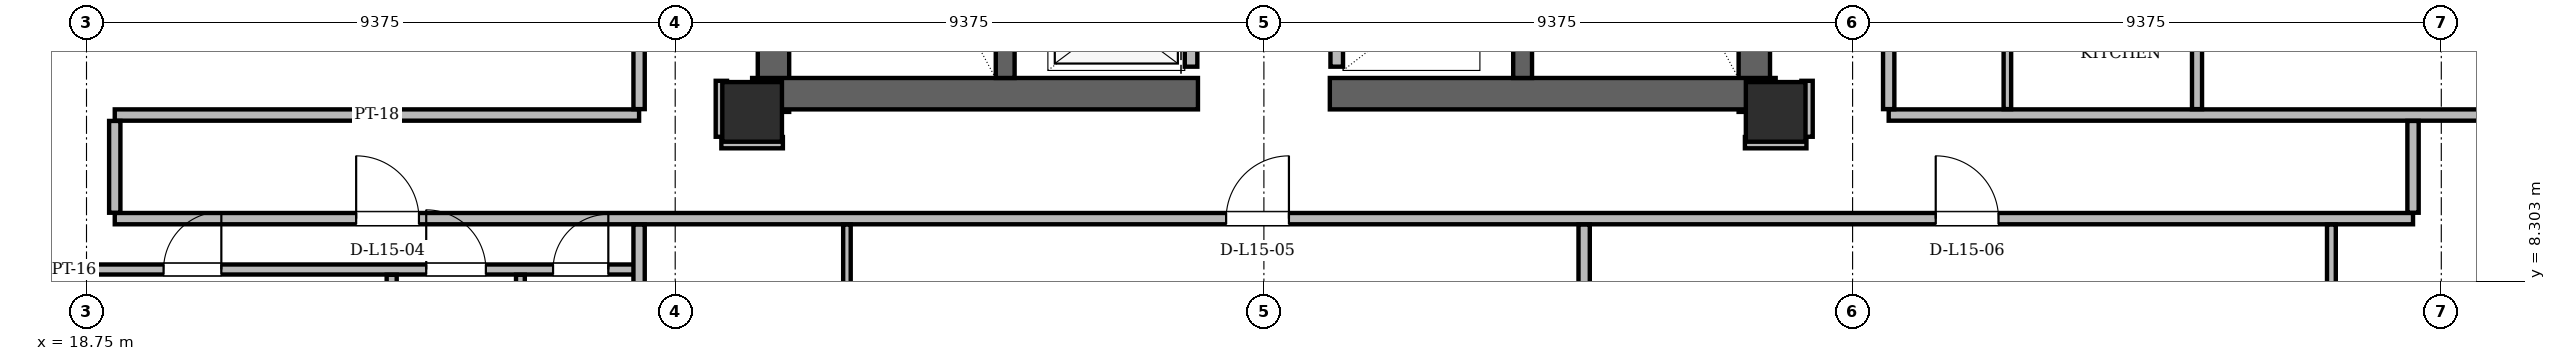
"""IFC4 building model, lengths in metres.
Left out: names, types, materials, properties, quantities, classifications, styles, units other than length and angle.
Written with IfcOpenShell. Run it as: python <this file> out.ifc"""

import sys

from ifc_helpers import new_model, si_unit, direction, frame, frame_2d, origin, origin_2d, place, context, subcontext, project, spatial, rectangle, hollow_rectangle, extrude, element, fill, save


model = new_model("IFC4")
c1 = context("Model", 3, precision=1e-05, world=origin(), true_north=direction((0.0, 1.0)))
c2 = subcontext(c1, "Body", "Model", "MODEL_VIEW")
j1 = project(units=[si_unit("LENGTHUNIT", "METRE"), si_unit("PLANEANGLEUNIT", "RADIAN")], contexts=[c1])
p1 = place(None, origin())
s1 = spatial("IfcSite", under=j1, at=p1, CompositionType="ELEMENT")
p2 = place(p1, origin())
s2 = spatial("IfcBuilding", under=s1, at=p2, CompositionType="ELEMENT")
p3 = place(p2, frame((0.0, 0.0, 59.7)))
s3 = spatial("IfcBuildingStorey", under=s2, at=p3, CompositionType="ELEMENT", Elevation=59.7)
for number, where, z_axis, x_axis in (
    (1, (29.35, 11.0, 0.0), (0.0, 0.0, 1.0), (1.0, 0.0, 0.0)),
    (2, (45.65, 11.0, 0.0), (0.0, 0.0, 1.0), (1.0, 0.0, 0.0)),
):
    element("IfcColumn", number, at=place(p3, frame(where, z_axis=z_axis, x_axis=x_axis)), inside=s3, PredefinedType="COLUMN", context=c2, shape_type="SweptSolid", body=[
        extrude(hollow_rectangle(XDim=0.95, YDim=0.95, WallThickness=0.08, at=origin_2d()), origin(), (0.0, 0.0, 1.0), 3.6),
    ])
for number, where, z_axis, x_axis in (
    (3, (29.69, 11.0, 0.0), (0.0, 0.0, 1.0), (0.0, 1.0, 0.0)),
    (4, (45.31, 11.0, 0.0), (0.0, 0.0, 1.0), (0.0, 1.0, 0.0)),
):
    element("IfcWall", number, at=place(p3, frame(where, z_axis=z_axis, x_axis=x_axis)), inside=s3, PredefinedType="SHEAR", context=c2, shape_type="SweptSolid", body=[
        extrude(rectangle(XDim=13.3, YDim=0.5, at=frame_2d((6.65, 0.0))), origin(), (0.0, 0.0, 1.0), 3.36),
    ])
for number, where, z_axis, x_axis in (
    (5, (29.35, 11.29, 0.0), (0.0, 0.0, 1.0), (1.0, 0.0, 0.0)),
    (6, (38.55, 11.29, 0.0), (0.0, 0.0, 1.0), (1.0, 0.0, 0.0)),
):
    element("IfcWall", number, at=place(p3, frame(where, z_axis=z_axis, x_axis=x_axis)), inside=s3, PredefinedType="SHEAR", context=c2, shape_type="SweptSolid", body=[
        extrude(rectangle(XDim=7.1, YDim=0.5, at=frame_2d((3.55, 0.0))), origin(), (0.0, 0.0, 1.0), 3.36),
    ])
for number, where, z_axis, x_axis in (
    (7, (33.38, 11.54, 0.0), (0.0, 0.0, 1.0), (0.0, 1.0, 0.0)),
    (8, (41.62, 11.54, 0.0), (0.0, 0.0, 1.0), (0.0, 1.0, 0.0)),
):
    element("IfcWall", number, at=place(p3, frame(where, z_axis=z_axis, x_axis=x_axis)), inside=s3, PredefinedType="SHEAR", context=c2, shape_type="SweptSolid", body=[
        extrude(rectangle(XDim=7.62, YDim=0.3, at=frame_2d((3.81, 0.0))), origin(), (0.0, 0.0, 1.0), 3.36),
    ])
p4 = place(p3, frame((13.666, 14.47, 0.0), z_axis=(0.0, 0.0, 1.0), x_axis=(0.499996557917, -0.866027391063, 0.0)))
e9 = element("IfcWall", 9, at=p4, inside=s3, PredefinedType="SOLIDWALL", context=c2, shape_type="SweptSolid", body=[
    extrude(rectangle(XDim=14.083, YDim=0.34, at=frame_2d((7.042, 0.0))), origin(), (0.0, 0.0, 1.0), 2.494),
])
p5 = place(p3, frame((54.292, 2.274, 0.0), z_axis=(0.0, 0.0, 1.0), x_axis=(0.499996557917, 0.866027391063, 0.0)))
e10 = element("IfcWall", 10, at=p5, inside=s3, PredefinedType="SOLIDWALL", context=c2, shape_type="SweptSolid", body=[
    extrude(rectangle(XDim=14.083, YDim=0.34, at=frame_2d((7.042, 0.0))), origin(), (0.0, 0.0, 1.0), 2.494),
])
p6 = place(p5, frame((8.787, 0.0, 0.85)))
e11 = element("IfcOpeningElement", 11, at=p6, cuts=e10, PredefinedType="OPENING", context=c2, shape_type="SweptSolid", body=[
    extrude(rectangle(XDim=1.2, YDim=1.48, at=frame_2d((0.6, 0.74))), frame((0.0, 0.17, 0.0), z_axis=(0.0, -1.0, 0.0), x_axis=(1.0, 0.0, 0.0)), (0.0, 0.0, 1.0), 0.34),
])
p7 = place(p3, frame((36.34, 11.72, 0.0), z_axis=(0.0, 0.0, 1.0), x_axis=(0.0, 1.0, 0.0)))
e12 = element("IfcWall", 12, at=p7, inside=s3, PredefinedType="PARTITIONING", context=c2, shape_type="SweptSolid", body=[
    extrude(rectangle(XDim=7.6, YDim=0.2, at=frame_2d((3.8, 0.0))), origin(), (0.0, 0.0, 1.0), 3.36),
])
p8 = place(p7, frame((0.255, 0.0, 0.0)))
e13 = element("IfcOpeningElement", 13, at=p8, cuts=e12, PredefinedType="OPENING", context=c2, shape_type="SweptSolid", body=[
    extrude(rectangle(XDim=1.05, YDim=2.15, at=frame_2d((0.525, 1.075))), frame((0.0, 0.1, 0.0), z_axis=(0.0, -1.0, 0.0), x_axis=(1.0, 0.0, 0.0)), (0.0, 0.0, 1.0), 0.2),
])
p9 = place(p7, frame((2.105, 0.0, 0.0)))
e14 = element("IfcOpeningElement", 14, at=p9, cuts=e12, PredefinedType="OPENING", context=c2, shape_type="SweptSolid", body=[
    extrude(rectangle(XDim=1.05, YDim=2.15, at=frame_2d((0.525, 1.075))), frame((0.0, 0.1, 0.0), z_axis=(0.0, -1.0, 0.0), x_axis=(1.0, 0.0, 0.0)), (0.0, 0.0, 1.0), 0.2),
])
p10 = place(p7, frame((3.955, 0.0, 0.0)))
e15 = element("IfcOpeningElement", 15, at=p10, cuts=e12, PredefinedType="OPENING", context=c2, shape_type="SweptSolid", body=[
    extrude(rectangle(XDim=1.05, YDim=2.15, at=frame_2d((0.525, 1.075))), frame((0.0, 0.1, 0.0), z_axis=(0.0, -1.0, 0.0), x_axis=(1.0, 0.0, 0.0)), (0.0, 0.0, 1.0), 0.2),
])
p11 = place(p3, frame((38.66, 11.72, 0.0), z_axis=(0.0, 0.0, 1.0), x_axis=(0.0, 1.0, 0.0)))
e16 = element("IfcWall", 16, at=p11, inside=s3, PredefinedType="PARTITIONING", context=c2, shape_type="SweptSolid", body=[
    extrude(rectangle(XDim=9.1, YDim=0.2, at=frame_2d((4.55, 0.0))), origin(), (0.0, 0.0, 1.0), 3.36),
])
p12 = place(p3, frame((17.32, 8.49, 0.0), z_axis=(0.0, 0.0, 1.0), x_axis=(1.0, 0.0, 0.0)))
e17 = element("IfcWall", 17, at=p12, inside=s3, PredefinedType="PARTITIONING", context=c2, shape_type="SweptSolid", body=[
    extrude(rectangle(XDim=10.281, YDim=0.16, at=frame_2d((5.14, 0.0))), origin(), (0.0, 0.0, 1.0), 2.738),
])
p13 = place(p12, frame((2.658, 0.0, 0.0)))
e18 = element("IfcOpeningElement", 18, at=p13, cuts=e17, PredefinedType="OPENING", context=c2, shape_type="SweptSolid", body=[
    extrude(rectangle(XDim=0.92, YDim=2.12, at=frame_2d((0.46, 1.06))), frame((0.0, 0.08, 0.0), z_axis=(0.0, -1.0, 0.0), x_axis=(1.0, 0.0, 0.0)), (0.0, 0.0, 1.0), 0.16),
])
p14 = place(p12, frame((6.841, 0.0, 0.0)))
e19 = element("IfcOpeningElement", 19, at=p14, cuts=e17, PredefinedType="OPENING", context=c2, shape_type="SweptSolid", body=[
    extrude(rectangle(XDim=0.95, YDim=2.1, at=frame_2d((0.475, 1.05))), frame((0.0, 0.08, 0.0), z_axis=(0.0, -1.0, 0.0), x_axis=(1.0, 0.0, 0.0)), (0.0, 0.0, 1.0), 0.16),
])
p15 = place(p12, frame((8.861, 0.0, 0.0)))
e20 = element("IfcOpeningElement", 20, at=p15, cuts=e17, PredefinedType="OPENING", context=c2, shape_type="SweptSolid", body=[
    extrude(rectangle(XDim=0.88, YDim=2.08, at=frame_2d((0.44, 1.04))), frame((0.0, 0.08, 0.0), z_axis=(0.0, -1.0, 0.0), x_axis=(1.0, 0.0, 0.0)), (0.0, 0.0, 1.0), 0.16),
])
p16 = place(p3, frame((19.2, 9.3, 0.0), z_axis=(0.0, 0.0, 1.0), x_axis=(1.0, 0.0, 0.0)))
e21 = element("IfcWall", 21, at=p16, inside=s3, PredefinedType="PARTITIONING", context=c2, shape_type="SweptSolid", body=[
    extrude(rectangle(XDim=36.6, YDim=0.18, at=frame_2d((18.3, 0.0))), origin(), (0.0, 0.0, 1.0), 2.738),
])
p17 = place(p16, frame((3.844, 0.0, 0.0)))
e22 = element("IfcOpeningElement", 22, at=p17, cuts=e21, PredefinedType="OPENING", context=c2, shape_type="SweptSolid", body=[
    extrude(rectangle(XDim=1.0, YDim=2.18, at=frame_2d((0.5, 1.09))), frame((0.0, 0.09, 0.0), z_axis=(0.0, -1.0, 0.0), x_axis=(1.0, 0.0, 0.0)), (0.0, 0.0, 1.0), 0.18),
])
p18 = place(p16, frame((17.699, 0.0, 0.0)))
e23 = element("IfcOpeningElement", 23, at=p18, cuts=e21, PredefinedType="OPENING", context=c2, shape_type="SweptSolid", body=[
    extrude(rectangle(XDim=1.0, YDim=2.18, at=frame_2d((0.5, 1.09))), frame((0.0, 0.09, 0.0), z_axis=(0.0, -1.0, 0.0), x_axis=(1.0, 0.0, 0.0)), (0.0, 0.0, 1.0), 0.18),
])
p19 = place(p16, frame((28.999, 0.0, 0.0)))
e24 = element("IfcOpeningElement", 24, at=p19, cuts=e21, PredefinedType="OPENING", context=c2, shape_type="SweptSolid", body=[
    extrude(rectangle(XDim=1.0, YDim=2.18, at=frame_2d((0.5, 1.09))), frame((0.0, 0.09, 0.0), z_axis=(0.0, -1.0, 0.0), x_axis=(1.0, 0.0, 0.0)), (0.0, 0.0, 1.0), 0.18),
])
for number, where, z_axis, x_axis in (
    (25, (28.86, 10.51, 0.0), (0.0, 0.0, 1.0), (1.0, 0.0, 0.0)),
    (26, (45.16, 10.51, 0.0), (0.0, 0.0, 1.0), (1.0, 0.0, 0.0)),
):
    element("IfcWall", number, at=place(p3, frame(where, z_axis=z_axis, x_axis=x_axis)), inside=s3, PredefinedType="PARTITIONING", context=c2, shape_type="SweptSolid", body=[
        extrude(rectangle(XDim=0.98, YDim=0.18, at=frame_2d((0.49, 0.0))), origin(), (0.0, 0.0, 1.0), 2.738),
    ])
p20 = place(p3, frame((19.2, 10.95, 0.0), z_axis=(0.0, 0.0, 1.0), x_axis=(1.0, 0.0, 0.0)))
e27 = element("IfcWall", 27, at=p20, inside=s3, PredefinedType="PARTITIONING", context=c2, shape_type="SweptSolid", body=[
    extrude(rectangle(XDim=8.35, YDim=0.18, at=frame_2d((4.175, 0.0))), origin(), (0.0, 0.0, 1.0), 3.36),
])
p21 = place(p3, frame((47.45, 10.95, 0.0), z_axis=(0.0, 0.0, 1.0), x_axis=(1.0, 0.0, 0.0)))
e28 = element("IfcWall", 28, at=p21, inside=s3, PredefinedType="PARTITIONING", context=c2, shape_type="SweptSolid", body=[
    extrude(rectangle(XDim=11.651, YDim=0.18, at=frame_2d((5.825, 0.0))), origin(), (0.0, 0.0, 1.0), 3.36),
])
p22 = place(p3, frame((19.2, 9.394, 0.0), z_axis=(0.0, 0.0, 1.0), x_axis=(0.0, 1.0, 0.0)))
e29 = element("IfcWall", 29, at=p22, inside=s3, PredefinedType="PARTITIONING", context=c2, shape_type="SweptSolid", body=[
    extrude(rectangle(XDim=1.462, YDim=0.18, at=frame_2d((0.731, 0.0))), origin(), (0.0, 0.0, 1.0), 3.36),
])
p23 = place(p3, frame((23.61, 2.448, 0.0), z_axis=(0.0, 0.0, 1.0), x_axis=(0.0, 1.0, 0.0)))
e30 = element("IfcWall", 30, at=p23, inside=s3, PredefinedType="PARTITIONING", context=c2, shape_type="SweptSolid", body=[
    extrude(rectangle(XDim=5.958, YDim=0.16, at=frame_2d((2.979, 0.0))), origin(), (0.0, 0.0, 1.0), 2.738),
])
p24 = place(p3, frame((25.66, 2.448, 0.0), z_axis=(0.0, 0.0, 1.0), x_axis=(0.0, 1.0, 0.0)))
e31 = element("IfcWall", 31, at=p24, inside=s3, PredefinedType="PARTITIONING", context=c2, shape_type="SweptSolid", body=[
    extrude(rectangle(XDim=5.958, YDim=0.14, at=frame_2d((2.979, 0.0))), origin(), (0.0, 0.0, 1.0), 2.738),
])
p25 = place(p3, frame((27.55, 2.448, 0.0), z_axis=(0.0, 0.0, 1.0), x_axis=(0.0, 1.0, 0.0)))
e32 = element("IfcWall", 32, at=p25, inside=s3, PredefinedType="PARTITIONING", context=c2, shape_type="SweptSolid", body=[
    extrude(rectangle(XDim=6.758, YDim=0.18, at=frame_2d((3.379, 0.0))), origin(), (0.0, 0.0, 1.0), 2.738),
])
p26 = place(p3, frame((27.55, 11.044, 0.0), z_axis=(0.0, 0.0, 1.0), x_axis=(0.0, 1.0, 0.0)))
e33 = element("IfcWall", 33, at=p26, inside=s3, PredefinedType="PARTITIONING", context=c2, shape_type="SweptSolid", body=[
    extrude(rectangle(XDim=27.127, YDim=0.18, at=frame_2d((13.563, 0.0))), origin(), (0.0, 0.0, 1.0), 2.494),
])
p27 = place(p26, frame((10.795, 0.0, 0.0)))
e34 = element("IfcOpeningElement", 34, at=p27, cuts=e33, PredefinedType="OPENING", context=c2, shape_type="SweptSolid", body=[
    extrude(rectangle(XDim=1.0, YDim=2.18, at=frame_2d((0.5, 1.09))), frame((0.0, 0.09, 0.0), z_axis=(0.0, -1.0, 0.0), x_axis=(1.0, 0.0, 0.0)), (0.0, 0.0, 1.0), 0.18),
])
p28 = place(p3, frame((28.86, 10.604, 0.0), z_axis=(0.0, 0.0, 1.0), x_axis=(0.0, 1.0, 0.0)))
e35 = element("IfcWall", 35, at=p28, inside=s3, PredefinedType="PARTITIONING", context=c2, shape_type="SweptSolid", body=[
    extrude(rectangle(XDim=0.891, YDim=0.18, at=frame_2d((0.446, 0.0))), origin(), (0.0, 0.0, 1.0), 2.738),
])
p29 = place(p3, frame((30.86, 2.542, 0.0), z_axis=(0.0, 0.0, 1.0), x_axis=(0.0, 1.0, 0.0)))
e36 = element("IfcWall", 36, at=p29, inside=s3, PredefinedType="PARTITIONING", context=c2, shape_type="SweptSolid", body=[
    extrude(rectangle(XDim=6.664, YDim=0.12, at=frame_2d((3.332, 0.0))), origin(), (0.0, 0.0, 1.0), 2.946),
])
p30 = place(p29, frame((2.879, 0.0, 0.0)))
e37 = element("IfcOpeningElement", 37, at=p30, cuts=e36, PredefinedType="OPENING", context=c2, shape_type="SweptSolid", body=[
    extrude(rectangle(XDim=0.88, YDim=2.08, at=frame_2d((0.44, 1.04))), frame((0.0, 0.06, 0.0), z_axis=(0.0, -1.0, 0.0), x_axis=(1.0, 0.0, 0.0)), (0.0, 0.0, 1.0), 0.12),
])
p31 = place(p3, frame((42.6, 2.448, 0.0), z_axis=(0.0, 0.0, 1.0), x_axis=(0.0, 1.0, 0.0)))
e38 = element("IfcWall", 38, at=p31, inside=s3, PredefinedType="PARTITIONING", context=c2, shape_type="SweptSolid", body=[
    extrude(rectangle(XDim=6.758, YDim=0.18, at=frame_2d((3.379, 0.0))), origin(), (0.0, 0.0, 1.0), 2.946),
])
p32 = place(p3, frame((46.15, 10.604, 0.0), z_axis=(0.0, 0.0, 1.0), x_axis=(0.0, 1.0, 0.0)))
e39 = element("IfcWall", 39, at=p32, inside=s3, PredefinedType="PARTITIONING", context=c2, shape_type="SweptSolid", body=[
    extrude(rectangle(XDim=0.891, YDim=0.18, at=frame_2d((0.446, 0.0))), origin(), (0.0, 0.0, 1.0), 2.738),
])
p33 = place(p3, frame((47.45, 11.044, 0.0), z_axis=(0.0, 0.0, 1.0), x_axis=(0.0, 1.0, 0.0)))
e40 = element("IfcWall", 40, at=p33, inside=s3, PredefinedType="PARTITIONING", context=c2, shape_type="SweptSolid", body=[
    extrude(rectangle(XDim=14.832, YDim=0.18, at=frame_2d((7.416, 0.0))), origin(), (0.0, 0.0, 1.0), 2.738),
])
p34 = place(p33, frame((6.079, 0.0, 0.0)))
e41 = element("IfcOpeningElement", 41, at=p34, cuts=e40, PredefinedType="OPENING", context=c2, shape_type="SweptSolid", body=[
    extrude(rectangle(XDim=1.0, YDim=2.18, at=frame_2d((0.5, 1.09))), frame((0.0, 0.09, 0.0), z_axis=(0.0, -1.0, 0.0), x_axis=(1.0, 0.0, 0.0)), (0.0, 0.0, 1.0), 0.18),
])
p35 = place(p33, frame((10.668, 0.0, 0.0)))
e42 = element("IfcOpeningElement", 42, at=p35, cuts=e40, PredefinedType="OPENING", context=c2, shape_type="SweptSolid", body=[
    extrude(rectangle(XDim=1.0, YDim=2.18, at=frame_2d((0.5, 1.09))), frame((0.0, 0.09, 0.0), z_axis=(0.0, -1.0, 0.0), x_axis=(1.0, 0.0, 0.0)), (0.0, 0.0, 1.0), 0.18),
])
p36 = place(p3, frame((49.34, 11.044, 0.0), z_axis=(0.0, 0.0, 1.0), x_axis=(0.0, 1.0, 0.0)))
e43 = element("IfcWall", 43, at=p36, inside=s3, PredefinedType="PARTITIONING", context=c2, shape_type="SweptSolid", body=[
    extrude(rectangle(XDim=3.102, YDim=0.12, at=frame_2d((1.551, 0.0))), origin(), (0.0, 0.0, 1.0), 2.738),
])
p37 = place(p3, frame((52.36, 11.044, 0.0), z_axis=(0.0, 0.0, 1.0), x_axis=(0.0, 1.0, 0.0)))
e44 = element("IfcWall", 44, at=p37, inside=s3, PredefinedType="PARTITIONING", context=c2, shape_type="SweptSolid", body=[
    extrude(rectangle(XDim=3.102, YDim=0.16, at=frame_2d((1.551, 0.0))), origin(), (0.0, 0.0, 1.0), 2.738),
])
p38 = place(p3, frame((54.5, 2.981, 0.0), z_axis=(0.0, 0.0, 1.0), x_axis=(0.0, 1.0, 0.0)))
e45 = element("IfcWall", 45, at=p38, inside=s3, PredefinedType="PARTITIONING", context=c2, shape_type="SweptSolid", body=[
    extrude(rectangle(XDim=6.225, YDim=0.14, at=frame_2d((3.112, 0.0))), origin(), (0.0, 0.0, 1.0), 3.36),
])
p39 = place(p38, frame((2.693, 0.0, 0.0)))
e46 = element("IfcOpeningElement", 46, at=p39, cuts=e45, PredefinedType="OPENING", context=c2, shape_type="SweptSolid", body=[
    extrude(rectangle(XDim=0.88, YDim=2.08, at=frame_2d((0.44, 1.04))), frame((0.0, 0.07, 0.0), z_axis=(0.0, -1.0, 0.0), x_axis=(1.0, 0.0, 0.0)), (0.0, 0.0, 1.0), 0.14),
])
p40 = place(p3, frame((55.8, 9.394, 0.0), z_axis=(0.0, 0.0, 1.0), x_axis=(0.0, 1.0, 0.0)))
e47 = element("IfcWall", 47, at=p40, inside=s3, PredefinedType="PARTITIONING", context=c2, shape_type="SweptSolid", body=[
    extrude(rectangle(XDim=1.462, YDim=0.18, at=frame_2d((0.731, 0.0))), origin(), (0.0, 0.0, 1.0), 3.36),
])
p41 = place(p13, origin())
e48 = element("IfcDoor", 48, at=p41, inside=s3, OperationType="SINGLE_SWING_RIGHT", PredefinedType="DOOR", context=c2, shape_type="SweptSolid", body=[
    extrude(rectangle(XDim=0.92, YDim=2.12, at=frame_2d((0.46, 1.06))), frame((0.0, 0.025, 0.0), z_axis=(0.0, -1.0, 0.0), x_axis=(1.0, 0.0, 0.0)), (0.0, 0.0, 1.0), 0.05),
])
fill(e18, e48)
p42 = place(p14, origin())
e49 = element("IfcDoor", 49, at=p42, inside=s3, OperationType="SINGLE_SWING_LEFT", PredefinedType="DOOR", context=c2, shape_type="SweptSolid", body=[
    extrude(rectangle(XDim=0.95, YDim=2.1, at=frame_2d((0.475, 1.05))), frame((0.0, 0.025, 0.0), z_axis=(0.0, -1.0, 0.0), x_axis=(1.0, 0.0, 0.0)), (0.0, 0.0, 1.0), 0.05),
])
fill(e19, e49)
p43 = place(p15, origin())
e50 = element("IfcDoor", 50, at=p43, inside=s3, OperationType="SINGLE_SWING_RIGHT", PredefinedType="DOOR", context=c2, shape_type="SweptSolid", body=[
    extrude(rectangle(XDim=0.88, YDim=2.08, at=frame_2d((0.44, 1.04))), frame((0.0, 0.025, 0.0), z_axis=(0.0, -1.0, 0.0), x_axis=(1.0, 0.0, 0.0)), (0.0, 0.0, 1.0), 0.05),
])
fill(e20, e50)
p44 = place(p17, origin())
e51 = element("IfcDoor", 51, at=p44, inside=s3, OperationType="SINGLE_SWING_LEFT", PredefinedType="DOOR", context=c2, shape_type="SweptSolid", body=[
    extrude(rectangle(XDim=1.0, YDim=2.18, at=frame_2d((0.5, 1.09))), frame((0.0, 0.025, 0.0), z_axis=(0.0, -1.0, 0.0), x_axis=(1.0, 0.0, 0.0)), (0.0, 0.0, 1.0), 0.05),
])
fill(e22, e51)
p45 = place(p18, origin())
e52 = element("IfcDoor", 52, at=p45, inside=s3, OperationType="SINGLE_SWING_RIGHT", PredefinedType="DOOR", context=c2, shape_type="SweptSolid", body=[
    extrude(rectangle(XDim=1.0, YDim=2.18, at=frame_2d((0.5, 1.09))), frame((0.0, 0.025, 0.0), z_axis=(0.0, -1.0, 0.0), x_axis=(1.0, 0.0, 0.0)), (0.0, 0.0, 1.0), 0.05),
])
fill(e23, e52)
p46 = place(p19, origin())
e53 = element("IfcDoor", 53, at=p46, inside=s3, OperationType="SINGLE_SWING_LEFT", PredefinedType="DOOR", context=c2, shape_type="SweptSolid", body=[
    extrude(rectangle(XDim=1.0, YDim=2.18, at=frame_2d((0.5, 1.09))), frame((0.0, 0.025, 0.0), z_axis=(0.0, -1.0, 0.0), x_axis=(1.0, 0.0, 0.0)), (0.0, 0.0, 1.0), 0.05),
])
fill(e24, e53)
save(model, sys.argv[1])
